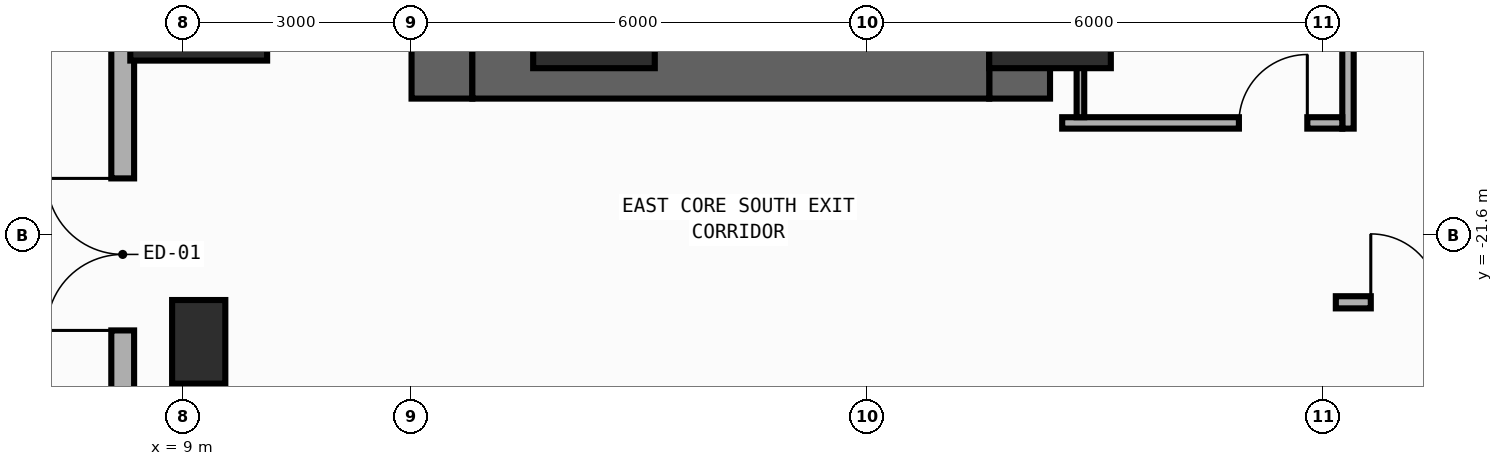
"""IFC4 building model, lengths in metres.
Left out: names, types, materials, properties, quantities, classifications, styles, units other than length and angle.
Written with IfcOpenShell. Run it as: python <this file> out.ifc"""

import sys

from ifc_helpers import new_model, si_unit, direction, frame, frame_2d, origin, origin_2d, place, context, subcontext, project, spatial, rectangle, extrude, element, fill, save


model = new_model("IFC4")
c1 = context("Model", 3, precision=1e-05, world=origin(), true_north=direction((0.0, 1.0)))
c2 = subcontext(c1, "Body", "Model", "MODEL_VIEW")
j1 = project(units=[si_unit("LENGTHUNIT", "METRE"), si_unit("PLANEANGLEUNIT", "RADIAN")], contexts=[c1])
p1 = place(None, origin())
s1 = spatial("IfcSite", under=j1, at=p1, CompositionType="ELEMENT")
p2 = place(p1, origin())
s2 = spatial("IfcBuilding", under=s1, at=p2, CompositionType="ELEMENT")
p3 = place(p2, origin())
s3 = spatial("IfcBuildingStorey", under=s2, at=p3, CompositionType="ELEMENT", Elevation=0.0)
p4 = place(p3, frame((12.4, -19.8, 0.0), z_axis=(0.0, 0.0, 1.0), x_axis=(0.0, 1.0, 0.0)))
e1 = element("IfcWall", 1, at=p4, inside=s3, PredefinedType="SHEAR", context=c2, shape_type="SweptSolid", body=[
    extrude(rectangle(XDim=27.0, YDim=0.8, at=frame_2d((13.5, 0.0))), origin(), (0.0, 0.0, 1.0), 5.7),
])
p5 = place(p4, frame((23.05, 0.0, 0.0)))
e2 = element("IfcOpeningElement", 2, at=p5, cuts=e1, PredefinedType="OPENING", context=c2, shape_type="SweptSolid", body=[
    extrude(rectangle(XDim=1.1, YDim=2.2, at=frame_2d((0.55, 1.1))), frame((0.0, 0.41, 0.0), z_axis=(0.0, -1.0, 0.0), x_axis=(1.0, 0.0, 0.0)), (0.0, 0.0, 1.0), 0.82),
])
p6 = place(p4, frame((19.85, 0.0, 0.0)))
e3 = element("IfcOpeningElement", 3, at=p6, cuts=e1, PredefinedType="OPENING", context=c2, shape_type="SweptSolid", body=[
    extrude(rectangle(XDim=1.1, YDim=2.2, at=frame_2d((0.55, 1.1))), frame((0.0, 0.41, 0.0), z_axis=(0.0, -1.0, 0.0), x_axis=(1.0, 0.0, 0.0)), (0.0, 0.0, 1.0), 0.82),
])
p7 = place(p4, frame((16.65, 0.0, 0.0)))
e4 = element("IfcOpeningElement", 4, at=p7, cuts=e1, PredefinedType="OPENING", context=c2, shape_type="SweptSolid", body=[
    extrude(rectangle(XDim=1.1, YDim=2.2, at=frame_2d((0.55, 1.1))), frame((0.0, 0.41, 0.0), z_axis=(0.0, -1.0, 0.0), x_axis=(1.0, 0.0, 0.0)), (0.0, 0.0, 1.0), 0.82),
])
p8 = place(p4, frame((10.175, 0.0, 0.0)))
e5 = element("IfcOpeningElement", 5, at=p8, cuts=e1, PredefinedType="OPENING", context=c2, shape_type="SweptSolid", body=[
    extrude(rectangle(XDim=0.85, YDim=2.1, at=frame_2d((0.425, 1.05))), frame((0.0, 0.41, 0.0), z_axis=(0.0, -1.0, 0.0), x_axis=(1.0, 0.0, 0.0)), (0.0, 0.0, 1.0), 0.82),
])
p9 = place(p4, frame((12.725, 0.0, 0.0)))
e6 = element("IfcOpeningElement", 6, at=p9, cuts=e1, PredefinedType="OPENING", context=c2, shape_type="SweptSolid", body=[
    extrude(rectangle(XDim=1.15, YDim=2.2, at=frame_2d((0.575, 1.1))), frame((0.0, 0.41, 0.0), z_axis=(0.0, -1.0, 0.0), x_axis=(1.0, 0.0, 0.0)), (0.0, 0.0, 1.0), 0.82),
])
p10 = place(p4, frame((25.125, 0.0, 0.0)))
e7 = element("IfcOpeningElement", 7, at=p10, cuts=e1, PredefinedType="OPENING", context=c2, shape_type="SweptSolid", body=[
    extrude(rectangle(XDim=0.85, YDim=2.1, at=frame_2d((0.425, 1.05))), frame((0.0, 0.41, 0.0), z_axis=(0.0, -1.0, 0.0), x_axis=(1.0, 0.0, 0.0)), (0.0, 0.0, 1.0), 0.82),
])
p11 = place(p3, frame((20.0, -19.8, 0.0), z_axis=(0.0, 0.0, 1.0), x_axis=(0.0, 1.0, 0.0)))
e8 = element("IfcWall", 8, at=p11, inside=s3, PredefinedType="SHEAR", context=c2, shape_type="SweptSolid", body=[
    extrude(rectangle(XDim=27.0, YDim=0.8, at=frame_2d((13.5, 0.0))), origin(), (0.0, 0.0, 1.0), 5.7),
])
p12 = place(p3, frame((12.8, -19.4, 0.0), z_axis=(0.0, 0.0, 1.0), x_axis=(1.0, 0.0, 0.0)))
e9 = element("IfcWall", 9, at=p12, inside=s3, PredefinedType="SHEAR", context=c2, shape_type="SweptSolid", body=[
    extrude(rectangle(XDim=6.8, YDim=0.8, at=frame_2d((3.4, 0.0))), origin(), (0.0, 0.0, 1.0), 5.7),
])
p13 = place(p3, frame((9.2, -18.6, 0.0), z_axis=(0.0, 0.0, 1.0), x_axis=(1.0, 0.0, 0.0)))
e10 = element("IfcColumn", 10, at=p13, inside=s3, PredefinedType="COLUMN", context=c2, shape_type="SweptSolid", body=[
    extrude(rectangle(XDim=1.8, YDim=1.4, at=origin_2d()), origin(), (0.0, 0.0, 1.0), 6.0),
])
for number, where, z_axis, x_axis in (
    (11, (20.4, -18.6, 0.0), (0.0, 0.0, 1.0), (1.0, 0.0, 0.0)),
    (12, (14.4, -18.6, 0.0), (0.0, 0.0, 1.0), (1.0, 0.0, 0.0)),
):
    element("IfcColumn", number, at=place(p3, frame(where, z_axis=z_axis, x_axis=x_axis)), inside=s3, PredefinedType="COLUMN", context=c2, shape_type="SweptSolid", body=[
        extrude(rectangle(XDim=1.6, YDim=1.6, at=origin_2d()), origin(), (0.0, 0.0, 1.0), 6.0),
    ])
p14 = place(p3, frame((9.2, -23.0, 0.0), z_axis=(0.0, 0.0, 1.0), x_axis=(1.0, 0.0, 0.0)))
e13 = element("IfcColumn", 13, at=p14, inside=s3, PredefinedType="PILASTER", context=c2, shape_type="SweptSolid", body=[
    extrude(rectangle(XDim=0.7, YDim=1.1, at=origin_2d()), origin(), (0.0, 0.0, 1.0), 6.0),
])
p15 = place(p3, frame((8.2, -27.25, 0.0), z_axis=(0.0, 0.0, 1.0), x_axis=(0.0, 1.0, 0.0)))
e14 = element("IfcWall", 14, at=p15, inside=s3, PredefinedType="STANDARD", context=c2, shape_type="SweptSolid", body=[
    extrude(rectangle(XDim=54.5, YDim=0.3, at=frame_2d((27.25, 0.0))), origin(), (0.0, 0.0, 1.0), 5.7),
])
p16 = place(p15, frame((4.4, 0.0, 0.0)))
e15 = element("IfcOpeningElement", 15, at=p16, cuts=e14, PredefinedType="OPENING", context=c2, shape_type="SweptSolid", body=[
    extrude(rectangle(XDim=2.0, YDim=2.4, at=frame_2d((1.0, 1.2))), frame((0.0, 0.16, 0.0), z_axis=(0.0, -1.0, 0.0), x_axis=(1.0, 0.0, 0.0)), (0.0, 0.0, 1.0), 0.32),
])
p17 = place(p15, frame((20.0, 0.0, 0.85)))
e16 = element("IfcOpeningElement", 16, at=p17, cuts=e14, PredefinedType="OPENING", context=c2, shape_type="SweptSolid", body=[
    extrude(rectangle(XDim=1.2, YDim=1.65, at=frame_2d((0.6, 0.825))), frame((0.0, 0.16, 0.0), z_axis=(0.0, -1.0, 0.0), x_axis=(1.0, 0.0, 0.0)), (0.0, 0.0, 1.0), 0.32),
])
p18 = place(p15, frame((30.0, 0.0, 0.85)))
e17 = element("IfcOpeningElement", 17, at=p18, cuts=e14, PredefinedType="OPENING", context=c2, shape_type="SweptSolid", body=[
    extrude(rectangle(XDim=2.6, YDim=1.95, at=frame_2d((1.3, 0.975))), frame((0.0, 0.16, 0.0), z_axis=(0.0, -1.0, 0.0), x_axis=(1.0, 0.0, 0.0)), (0.0, 0.0, 1.0), 0.32),
])
p19 = place(p3, frame((24.16, -22.48, 0.0), z_axis=(0.0, 0.0, 1.0), x_axis=(1.0, 0.0, 0.0)))
e18 = element("IfcWall", 18, at=p19, inside=s3, PredefinedType="PARTITIONING", context=c2, shape_type="SweptSolid", body=[
    extrude(rectangle(XDim=2.715, YDim=0.16, at=frame_2d((1.357, 0.0))), origin(), (0.0, 0.0, 1.0), 5.7),
])
p20 = place(p19, frame((0.46, 0.0, 0.0)))
e19 = element("IfcOpeningElement", 19, at=p20, cuts=e18, PredefinedType="OPENING", context=c2, shape_type="SweptSolid", body=[
    extrude(rectangle(XDim=0.9, YDim=2.15, at=frame_2d((0.45, 1.075))), frame((0.0, 0.09, 0.0), z_axis=(0.0, -1.0, 0.0), x_axis=(1.0, 0.0, 0.0)), (0.0, 0.0, 1.0), 0.18),
])
p21 = place(p3, frame((24.32, -20.195, 0.0), z_axis=(0.0, 0.0, 1.0), x_axis=(0.0, 1.0, 0.0)))
e20 = element("IfcWall", 20, at=p21, inside=s3, PredefinedType="PARTITIONING", context=c2, shape_type="SweptSolid", body=[
    extrude(rectangle(XDim=4.675, YDim=0.15, at=frame_2d((2.337, 0.0))), origin(), (0.0, 0.0, 1.0), 5.7),
])
p22 = place(p21, frame((3.315, 0.0, 0.0)))
e21 = element("IfcOpeningElement", 21, at=p22, cuts=e20, PredefinedType="OPENING", context=c2, shape_type="SweptSolid", body=[
    extrude(rectangle(XDim=0.9, YDim=2.15, at=frame_2d((0.45, 1.075))), frame((0.0, 0.085, 0.0), z_axis=(0.0, -1.0, 0.0), x_axis=(1.0, 0.0, 0.0)), (0.0, 0.0, 1.0), 0.17),
])
p23 = place(p3, frame((20.56, -20.12, 0.0), z_axis=(0.0, 0.0, 1.0), x_axis=(1.0, 0.0, 0.0)))
e22 = element("IfcWall", 22, at=p23, inside=s3, PredefinedType="PARTITIONING", context=c2, shape_type="SweptSolid", body=[
    extrude(rectangle(XDim=3.685, YDim=0.15, at=frame_2d((1.843, 0.0))), origin(), (0.0, 0.0, 1.0), 5.7),
])
p24 = place(p23, frame((2.325, 0.0, 0.0)))
e23 = element("IfcOpeningElement", 23, at=p24, cuts=e22, PredefinedType="OPENING", context=c2, shape_type="SweptSolid", body=[
    extrude(rectangle(XDim=0.9, YDim=2.15, at=frame_2d((0.45, 1.075))), frame((0.0, 0.085, 0.0), z_axis=(0.0, -1.0, 0.0), x_axis=(1.0, 0.0, 0.0)), (0.0, 0.0, 1.0), 0.17),
])
p25 = place(p3, frame((20.8, -20.045, 0.0), z_axis=(0.0, 0.0, 1.0), x_axis=(0.0, 1.0, 0.0)))
e24 = element("IfcWall", 24, at=p25, inside=s3, PredefinedType="PARTITIONING", context=c2, shape_type="SweptSolid", body=[
    extrude(rectangle(XDim=4.455, YDim=0.1, at=frame_2d((2.228, 0.0))), origin(), (0.0, 0.0, 1.0), 5.7),
])
p26 = place(p16, origin())
e25 = element("IfcDoor", 25, at=p26, inside=s3, OperationType="DOUBLE_DOOR_SINGLE_SWING", PredefinedType="DOOR", context=c2, shape_type="SweptSolid", body=[
    extrude(rectangle(XDim=2.0, YDim=2.4, at=frame_2d((1.0, 1.2))), frame((0.0, 0.025, 0.0), z_axis=(0.0, -1.0, 0.0), x_axis=(1.0, 0.0, 0.0)), (0.0, 0.0, 1.0), 0.05),
])
fill(e15, e25)
p27 = place(p20, origin())
e26 = element("IfcDoor", 26, at=p27, inside=s3, OperationType="SINGLE_SWING_LEFT", PredefinedType="DOOR", context=c2, shape_type="SweptSolid", body=[
    extrude(rectangle(XDim=0.9, YDim=2.15, at=frame_2d((0.45, 1.075))), frame((0.0, 0.025, 0.0), z_axis=(0.0, -1.0, 0.0), x_axis=(1.0, 0.0, 0.0)), (0.0, 0.0, 1.0), 0.05),
])
fill(e19, e26)
p28 = place(p24, origin())
e27 = element("IfcDoor", 27, at=p28, inside=s3, OperationType="SINGLE_SWING_RIGHT", PredefinedType="DOOR", context=c2, shape_type="SweptSolid", body=[
    extrude(rectangle(XDim=0.9, YDim=2.15, at=frame_2d((0.45, 1.075))), frame((0.0, 0.025, 0.0), z_axis=(0.0, -1.0, 0.0), x_axis=(1.0, 0.0, 0.0)), (0.0, 0.0, 1.0), 0.05),
])
fill(e23, e27)
save(model, sys.argv[1])
